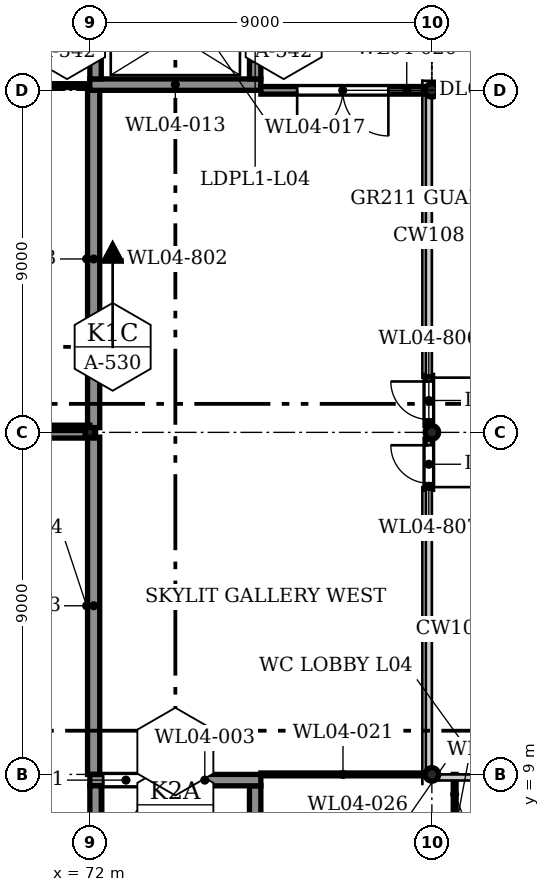
"""IFC4 building model, lengths in metres.
Left out: names, types, materials, properties, quantities, classifications, styles, units other than length and angle.
Written with IfcOpenShell. Run it as: python <this file> out.ifc"""

import sys

from ifc_helpers import new_model, si_unit, direction, frame, frame_2d, origin, origin_2d, place, context, subcontext, project, spatial, polyline, rectangle, hollow_rectangle, hollow_circle, outline, extrude, element, fill, save


model = new_model("IFC4")
c1 = context("Model", 3, precision=1e-05, world=origin(), true_north=direction((0.0, 1.0)))
c2 = subcontext(c1, "Body", "Model", "MODEL_VIEW")
j1 = project(units=[si_unit("LENGTHUNIT", "METRE"), si_unit("PLANEANGLEUNIT", "RADIAN")], contexts=[c1])
p1 = place(None, origin())
s1 = spatial("IfcSite", under=j1, at=p1, CompositionType="ELEMENT")
p2 = place(p1, origin())
s2 = spatial("IfcBuilding", under=s1, at=p2, CompositionType="ELEMENT")
p3 = place(p2, frame((0.0, 0.0, 21.2)))
s3 = spatial("IfcBuildingStorey", under=s2, at=p3, CompositionType="ELEMENT", Elevation=21.2)
p4 = place(p3, frame((81.0, 9.0, 0.0), z_axis=(0.0, 0.0, 1.0), x_axis=(1.0, 0.0, 0.0)))
e1 = element("IfcColumn", 1, at=p4, inside=s3, PredefinedType="COLUMN", context=c2, shape_type="SweptSolid", body=[
    extrude(hollow_circle(Radius=0.178, WallThickness=0.013, at=origin_2d()), origin(), (0.0, 0.0, 1.0), 3.6),
])
p5 = place(p3, frame((72.0, 18.0, 0.0), z_axis=(0.0, 0.0, 1.0), x_axis=(1.0, 0.0, 0.0)))
e2 = element("IfcColumn", 2, at=p5, inside=s3, PredefinedType="COLUMN", context=c2, shape_type="SweptSolid", body=[
    extrude(hollow_rectangle(XDim=0.25, YDim=0.25, WallThickness=0.01, InnerFilletRadius=0.015, OuterFilletRadius=0.025, at=origin_2d()), origin(), (0.0, 0.0, 1.0), 3.6),
])
for number, where, z_axis, x_axis in (
    (3, (81.0, 18.0, 0.0), (0.0, 0.0, 1.0), (1.0, 0.0, 0.0)),
    (4, (81.0, 27.0, 0.0), (0.0, 0.0, 1.0), (1.0, 0.0, 0.0)),
):
    element("IfcColumn", number, at=place(p3, frame(where, z_axis=z_axis, x_axis=x_axis)), inside=s3, PredefinedType="COLUMN", context=c2, shape_type="SweptSolid", body=[
        extrude(hollow_circle(Radius=0.178, WallThickness=0.013, at=origin_2d()), origin(), (0.0, 0.0, 1.0), 3.6),
    ])
for number, where, z_axis, x_axis in (
    (5, (72.1, 18.125, 0.0), (0.0, 0.0, 1.0), (0.0, 1.0, 0.0)),
    (6, (72.1, 9.0, 0.0), (0.0, 0.0, 1.0), (0.0, 1.0, 0.0)),
):
    element("IfcWall", number, at=place(p3, frame(where, z_axis=z_axis, x_axis=x_axis)), inside=s3, PredefinedType="SOLIDWALL", context=c2, shape_type="SweptSolid", body=[
        extrude(rectangle(XDim=8.875, YDim=0.32, at=frame_2d((4.438, 0.0))), origin(), (0.0, 0.0, 1.0), 3.878),
    ])
p6 = place(p3, frame((80.92, 18.178, 0.0), z_axis=(0.0, 0.0, 1.0), x_axis=(0.0, 1.0, 0.0)))
e7 = element("IfcWall", 7, at=p6, inside=s3, PredefinedType="SOLIDWALL", context=c2, shape_type="SweptSolid", body=[
    extrude(rectangle(XDim=1.322, YDim=0.2, at=frame_2d((0.661, 0.0))), origin(), (0.0, 0.0, 1.0), 3.878),
])
p7 = place(p6, frame((0.161, 0.0, 0.0)))
e8 = element("IfcOpeningElement", 8, at=p7, cuts=e7, PredefinedType="OPENING", context=c2, shape_type="SweptSolid", body=[
    extrude(rectangle(XDim=1.0, YDim=2.4, at=frame_2d((0.5, 1.2))), frame((0.0, 0.11, 0.0), z_axis=(0.0, -1.0, 0.0), x_axis=(1.0, 0.0, 0.0)), (0.0, 0.0, 1.0), 0.22),
])
p8 = place(p3, frame((80.92, 16.5, 0.0), z_axis=(0.0, 0.0, 1.0), x_axis=(0.0, 1.0, 0.0)))
e9 = element("IfcWall", 9, at=p8, inside=s3, PredefinedType="SOLIDWALL", context=c2, shape_type="SweptSolid", body=[
    extrude(rectangle(XDim=1.322, YDim=0.2, at=frame_2d((0.661, 0.0))), origin(), (0.0, 0.0, 1.0), 3.878),
])
p9 = place(p8, frame((0.161, 0.0, 0.0)))
e10 = element("IfcOpeningElement", 10, at=p9, cuts=e9, PredefinedType="OPENING", context=c2, shape_type="SweptSolid", body=[
    extrude(rectangle(XDim=1.0, YDim=2.4, at=frame_2d((0.5, 1.2))), frame((0.0, 0.11, 0.0), z_axis=(0.0, -1.0, 0.0), x_axis=(1.0, 0.0, 0.0)), (0.0, 0.0, 1.0), 0.22),
])
p10 = place(p3, frame((62.85, 18.139, -0.122), z_axis=(0.0, 0.0, 1.0), x_axis=(1.0, 0.0, 0.0)))
e11 = element("IfcWall", 11, at=p10, inside=s3, PredefinedType="SOLIDWALL", context=c2, shape_type="SweptSolid", body=[
    extrude(rectangle(XDim=9.15, YDim=0.1, at=frame_2d((4.575, 0.0))), origin(), (0.0, 0.0, 1.0), 1.722),
])
p11 = place(p10, frame((0.6, 0.0, 0.15)))
e12 = element("IfcOpeningElement", 12, at=p11, cuts=e11, PredefinedType="OPENING", context=c2, shape_type="SweptSolid", body=[
    extrude(rectangle(XDim=3.6, YDim=1.0, at=frame_2d((1.8, 0.5))), frame((0.0, 0.06, 0.0), z_axis=(0.0, -1.0, 0.0), x_axis=(1.0, 0.0, 0.0)), (0.0, 0.0, 1.0), 0.12),
])
p12 = place(p10, frame((5.1, 0.0, 0.15)))
e13 = element("IfcOpeningElement", 13, at=p12, cuts=e11, PredefinedType="OPENING", context=c2, shape_type="SweptSolid", body=[
    extrude(rectangle(XDim=3.6, YDim=1.0, at=frame_2d((1.8, 0.5))), frame((0.0, 0.06, 0.0), z_axis=(0.0, -1.0, 0.0), x_axis=(1.0, 0.0, 0.0)), (0.0, 0.0, 1.0), 0.12),
])
p13 = place(p3, frame((27.0, 27.125, -0.146), z_axis=(0.0, 0.0, 1.0), x_axis=(1.0, 0.0, 0.0)))
e14 = element("IfcWall", 14, at=p13, inside=s3, PredefinedType="SOLIDWALL", context=c2, shape_type="SweptSolid", body=[
    extrude(rectangle(XDim=45.0, YDim=0.1, at=frame_2d((22.5, 0.0))), origin(), (0.0, 0.0, 1.0), 1.746),
])
p14 = place(p13, frame((0.45, 0.0, 0.15)))
e15 = element("IfcOpeningElement", 15, at=p14, cuts=e14, PredefinedType="OPENING", context=c2, shape_type="SweptSolid", body=[
    extrude(rectangle(XDim=3.6, YDim=1.0, at=frame_2d((1.8, 0.5))), frame((0.0, 0.06, 0.0), z_axis=(0.0, -1.0, 0.0), x_axis=(1.0, 0.0, 0.0)), (0.0, 0.0, 1.0), 0.12),
])
p15 = place(p13, frame((4.95, 0.0, 0.15)))
e16 = element("IfcOpeningElement", 16, at=p15, cuts=e14, PredefinedType="OPENING", context=c2, shape_type="SweptSolid", body=[
    extrude(rectangle(XDim=3.6, YDim=1.0, at=frame_2d((1.8, 0.5))), frame((0.0, 0.06, 0.0), z_axis=(0.0, -1.0, 0.0), x_axis=(1.0, 0.0, 0.0)), (0.0, 0.0, 1.0), 0.12),
])
p16 = place(p13, frame((9.45, 0.0, 0.15)))
e17 = element("IfcOpeningElement", 17, at=p16, cuts=e14, PredefinedType="OPENING", context=c2, shape_type="SweptSolid", body=[
    extrude(rectangle(XDim=3.6, YDim=1.0, at=frame_2d((1.8, 0.5))), frame((0.0, 0.06, 0.0), z_axis=(0.0, -1.0, 0.0), x_axis=(1.0, 0.0, 0.0)), (0.0, 0.0, 1.0), 0.12),
])
p17 = place(p13, frame((13.95, 0.0, 0.15)))
e18 = element("IfcOpeningElement", 18, at=p17, cuts=e14, PredefinedType="OPENING", context=c2, shape_type="SweptSolid", body=[
    extrude(rectangle(XDim=3.6, YDim=1.0, at=frame_2d((1.8, 0.5))), frame((0.0, 0.06, 0.0), z_axis=(0.0, -1.0, 0.0), x_axis=(1.0, 0.0, 0.0)), (0.0, 0.0, 1.0), 0.12),
])
p18 = place(p13, frame((18.45, 0.0, 0.15)))
e19 = element("IfcOpeningElement", 19, at=p18, cuts=e14, PredefinedType="OPENING", context=c2, shape_type="SweptSolid", body=[
    extrude(rectangle(XDim=3.6, YDim=1.0, at=frame_2d((1.8, 0.5))), frame((0.0, 0.06, 0.0), z_axis=(0.0, -1.0, 0.0), x_axis=(1.0, 0.0, 0.0)), (0.0, 0.0, 1.0), 0.12),
])
p19 = place(p13, frame((22.95, 0.0, 0.15)))
e20 = element("IfcOpeningElement", 20, at=p19, cuts=e14, PredefinedType="OPENING", context=c2, shape_type="SweptSolid", body=[
    extrude(rectangle(XDim=3.6, YDim=1.0, at=frame_2d((1.8, 0.5))), frame((0.0, 0.06, 0.0), z_axis=(0.0, -1.0, 0.0), x_axis=(1.0, 0.0, 0.0)), (0.0, 0.0, 1.0), 0.12),
])
p20 = place(p13, frame((27.45, 0.0, 0.15)))
e21 = element("IfcOpeningElement", 21, at=p20, cuts=e14, PredefinedType="OPENING", context=c2, shape_type="SweptSolid", body=[
    extrude(rectangle(XDim=3.6, YDim=1.0, at=frame_2d((1.8, 0.5))), frame((0.0, 0.06, 0.0), z_axis=(0.0, -1.0, 0.0), x_axis=(1.0, 0.0, 0.0)), (0.0, 0.0, 1.0), 0.12),
])
p21 = place(p13, frame((31.95, 0.0, 0.15)))
e22 = element("IfcOpeningElement", 22, at=p21, cuts=e14, PredefinedType="OPENING", context=c2, shape_type="SweptSolid", body=[
    extrude(rectangle(XDim=3.6, YDim=1.0, at=frame_2d((1.8, 0.5))), frame((0.0, 0.06, 0.0), z_axis=(0.0, -1.0, 0.0), x_axis=(1.0, 0.0, 0.0)), (0.0, 0.0, 1.0), 0.12),
])
p22 = place(p13, frame((36.45, 0.0, 0.15)))
e23 = element("IfcOpeningElement", 23, at=p22, cuts=e14, PredefinedType="OPENING", context=c2, shape_type="SweptSolid", body=[
    extrude(rectangle(XDim=3.6, YDim=1.0, at=frame_2d((1.8, 0.5))), frame((0.0, 0.06, 0.0), z_axis=(0.0, -1.0, 0.0), x_axis=(1.0, 0.0, 0.0)), (0.0, 0.0, 1.0), 0.12),
])
p23 = place(p13, frame((40.95, 0.0, 0.15)))
e24 = element("IfcOpeningElement", 24, at=p23, cuts=e14, PredefinedType="OPENING", context=c2, shape_type="SweptSolid", body=[
    extrude(rectangle(XDim=3.6, YDim=1.0, at=frame_2d((1.8, 0.5))), frame((0.0, 0.06, 0.0), z_axis=(0.0, -1.0, 0.0), x_axis=(1.0, 0.0, 0.0)), (0.0, 0.0, 1.0), 0.12),
])
p24 = place(p2, frame((0.0, 0.0, 25.2)))
s4 = spatial("IfcBuildingStorey", under=s2, at=p24, CompositionType="ELEMENT", Elevation=25.2)
p25 = place(p24, frame((72.0, 18.139, -4.146), z_axis=(0.0, 0.0, 1.0), x_axis=(1.0, 0.0, 0.0)))
e25 = element("IfcWall", 25, at=p25, inside=s4, PredefinedType="SOLIDWALL", context=c2, shape_type="SweptSolid", body=[
    extrude(rectangle(XDim=9.0, YDim=0.1, at=frame_2d((4.5, 0.0))), origin(), (0.0, 0.0, 1.0), 5.746),
])
p26 = place(p25, frame((0.45, 0.0, 0.15)))
e26 = element("IfcOpeningElement", 26, at=p26, cuts=e25, PredefinedType="OPENING", context=c2, shape_type="SweptSolid", body=[
    extrude(rectangle(XDim=3.6, YDim=1.0, at=frame_2d((1.8, 0.5))), frame((0.0, 0.06, 0.0), z_axis=(0.0, -1.0, 0.0), x_axis=(1.0, 0.0, 0.0)), (0.0, 0.0, 1.0), 0.12),
])
p27 = place(p25, frame((4.95, 0.0, 0.15)))
e27 = element("IfcOpeningElement", 27, at=p27, cuts=e25, PredefinedType="OPENING", context=c2, shape_type="SweptSolid", body=[
    extrude(rectangle(XDim=3.6, YDim=1.0, at=frame_2d((1.8, 0.5))), frame((0.0, 0.06, 0.0), z_axis=(0.0, -1.0, 0.0), x_axis=(1.0, 0.0, 0.0)), (0.0, 0.0, 1.0), 0.12),
])
p28 = place(p3, frame((62.85, 17.95, -0.122), z_axis=(0.0, 0.0, 1.0), x_axis=(1.0, 0.0, 0.0)))
e28 = element("IfcWall", 28, at=p28, inside=s3, PredefinedType="PARAPET", context=c2, shape_type="SweptSolid", body=[
    extrude(rectangle(XDim=9.3, YDim=0.2, at=frame_2d((4.65, 0.0))), origin(), (0.0, 0.0, 1.0), 1.1),
])
p29 = place(p3, frame((72.1, 9.175, 3.878), z_axis=(0.0, 0.0, 1.0), x_axis=(0.0, 1.0, 0.0)))
e29 = element("IfcWall", 29, at=p29, inside=s3, PredefinedType="SOLIDWALL", context=c2, shape_type="SweptSolid", body=[
    extrude(outline(polyline([(0.0, 0.0), (8.825, 0.0), (8.825, 0.05), (0.0, 1.6), (0.0, 0.0)])), frame((0.0, 0.05, 0.0), z_axis=(0.0, -1.0, 0.0), x_axis=(1.0, 0.0, 0.0)), (0.0, 0.0, 1.0), 0.1),
])
p30 = place(p3, frame((72.1, 18.189, 3.878), z_axis=(0.0, 0.0, 1.0), x_axis=(0.0, 1.0, 0.0)))
e30 = element("IfcWall", 30, at=p30, inside=s3, PredefinedType="SOLIDWALL", context=c2, shape_type="SweptSolid", body=[
    extrude(outline(polyline([(0.0, 0.0), (8.811, 0.0), (8.811, 0.05), (0.0, 1.6), (0.0, 0.0)])), frame((0.0, 0.05, 0.0), z_axis=(0.0, -1.0, 0.0), x_axis=(1.0, 0.0, 0.0)), (0.0, 0.0, 1.0), 0.1),
])
p31 = place(p3, frame((76.35, 0.3, 0.0), z_axis=(0.0, 0.0, 1.0), x_axis=(0.0, 1.0, 0.0)))
e31 = element("IfcWall", 31, at=p31, inside=s3, PredefinedType="SOLIDWALL", context=c2, shape_type="SweptSolid", body=[
    extrude(rectangle(XDim=8.4, YDim=0.3, at=frame_2d((4.2, 0.0))), origin(), (0.0, 0.0, 1.0), 3.628),
])
p32 = place(p3, frame((72.0, 8.85, 0.0), z_axis=(0.0, 0.0, 1.0), x_axis=(1.0, 0.0, 0.0)))
e32 = element("IfcWall", 32, at=p32, inside=s3, PredefinedType="SOLIDWALL", context=c2, shape_type="SweptSolid", body=[
    extrude(rectangle(XDim=4.5, YDim=0.3, at=frame_2d((2.25, 0.0))), origin(), (0.0, 0.0, 1.0), 3.628),
])
p33 = place(p32, frame((0.35, 0.0, 0.0)))
e33 = element("IfcOpeningElement", 33, at=p33, cuts=e32, PredefinedType="OPENING", context=c2, shape_type="SweptSolid", body=[
    extrude(rectangle(XDim=1.2, YDim=2.1, at=frame_2d((0.6, 1.05))), frame((0.0, 0.16, 0.0), z_axis=(0.0, -1.0, 0.0), x_axis=(1.0, 0.0, 0.0)), (0.0, 0.0, 1.0), 0.32),
])
p34 = place(p3, frame((72.15, 0.3, 0.0), z_axis=(0.0, 0.0, 1.0), x_axis=(0.0, 1.0, 0.0)))
e34 = element("IfcWall", 34, at=p34, inside=s3, PredefinedType="SOLIDWALL", context=c2, shape_type="SweptSolid", body=[
    extrude(rectangle(XDim=8.4, YDim=0.3, at=frame_2d((4.2, 0.0))), origin(), (0.0, 0.0, 1.0), 3.628),
])
p35 = place(p3, frame((72.0, 27.15, 0.0), z_axis=(0.0, 0.0, 1.0), x_axis=(1.0, 0.0, 0.0)))
e35 = element("IfcWall", 35, at=p35, inside=s3, PredefinedType="SOLIDWALL", context=c2, shape_type="SweptSolid", body=[
    extrude(rectangle(XDim=4.5, YDim=0.3, at=frame_2d((2.25, 0.0))), origin(), (0.0, 0.0, 1.0), 3.628),
])
p36 = place(p3, frame((76.35, 27.3, 0.0), z_axis=(0.0, 0.0, 1.0), x_axis=(0.0, 1.0, 0.0)))
e36 = element("IfcWall", 36, at=p36, inside=s3, PredefinedType="SOLIDWALL", context=c2, shape_type="SweptSolid", body=[
    extrude(rectangle(XDim=8.4, YDim=0.3, at=frame_2d((4.2, 0.0))), origin(), (0.0, 0.0, 1.0), 3.628),
])
p37 = place(p36, frame((0.45, 0.0, 0.0)))
e37 = element("IfcOpeningElement", 37, at=p37, cuts=e36, PredefinedType="OPENING", context=c2, shape_type="SweptSolid", body=[
    extrude(rectangle(XDim=1.4, YDim=2.1, at=frame_2d((0.7, 1.05))), frame((0.0, 0.16, 0.0), z_axis=(0.0, -1.0, 0.0), x_axis=(1.0, 0.0, 0.0)), (0.0, 0.0, 1.0), 0.32),
])
p38 = place(p36, frame((4.925, 0.0, 0.0)))
e38 = element("IfcOpeningElement", 38, at=p38, cuts=e36, PredefinedType="OPENING", context=c2, shape_type="SweptSolid", body=[
    extrude(rectangle(XDim=1.0, YDim=2.1, at=frame_2d((0.5, 1.05))), frame((0.0, 0.16, 0.0), z_axis=(0.0, -1.0, 0.0), x_axis=(1.0, 0.0, 0.0)), (0.0, 0.0, 1.0), 0.32),
])
p39 = place(p3, frame((72.15, 27.3, 0.0), z_axis=(0.0, 0.0, 1.0), x_axis=(0.0, 1.0, 0.0)))
e39 = element("IfcWall", 39, at=p39, inside=s3, PredefinedType="SOLIDWALL", context=c2, shape_type="SweptSolid", body=[
    extrude(rectangle(XDim=8.4, YDim=0.3, at=frame_2d((4.2, 0.0))), origin(), (0.0, 0.0, 1.0), 3.628),
])
p40 = place(p3, frame((76.5, 27.0, 0.0), z_axis=(0.0, 0.0, 1.0), x_axis=(1.0, 0.0, 0.0)))
e40 = element("IfcWall", 40, at=p40, inside=s3, PredefinedType="PARTITIONING", context=c2, shape_type="SweptSolid", body=[
    extrude(rectangle(XDim=4.322, YDim=0.2, at=frame_2d((2.161, 0.0))), origin(), (0.0, 0.0, 1.0), 3.54),
])
p41 = place(p40, frame((0.955, 0.0, 0.0)))
e41 = element("IfcOpeningElement", 41, at=p41, cuts=e40, PredefinedType="OPENING", context=c2, shape_type="SweptSolid", body=[
    extrude(rectangle(XDim=2.4, YDim=2.4, at=frame_2d((1.2, 1.2))), frame((0.0, 0.11, 0.0), z_axis=(0.0, -1.0, 0.0), x_axis=(1.0, 0.0, 0.0)), (0.0, 0.0, 1.0), 0.22),
])
p42 = place(p3, frame((76.5, 9.0, 0.0), z_axis=(0.0, 0.0, 1.0), x_axis=(1.0, 0.0, 0.0)))
e42 = element("IfcWall", 42, at=p42, inside=s3, PredefinedType="PARTITIONING", context=c2, shape_type="SweptSolid", body=[
    extrude(rectangle(XDim=4.322, YDim=0.075, at=frame_2d((2.161, 0.0))), origin(), (0.0, 0.0, 1.0), 3.54),
])
p43 = place(p3, frame((81.6, 6.0, 0.0), z_axis=(0.0, 0.0, 1.0), x_axis=(0.0, 1.0, 0.0)))
e43 = element("IfcWall", 43, at=p43, inside=s3, PredefinedType="PARTITIONING", context=c2, shape_type="SweptSolid", body=[
    extrude(rectangle(XDim=3.0, YDim=0.075, at=frame_2d((1.5, 0.0))), origin(), (0.0, 0.0, 1.0), 3.54),
])
p44 = place(p43, frame((0.95, 0.0, 0.0)))
e44 = element("IfcOpeningElement", 44, at=p44, cuts=e43, PredefinedType="OPENING", context=c2, shape_type="SweptSolid", body=[
    extrude(rectangle(XDim=1.0, YDim=2.1, at=frame_2d((0.5, 1.05))), frame((0.0, 0.047, 0.0), z_axis=(0.0, -1.0, 0.0), x_axis=(1.0, 0.0, 0.0)), (0.0, 0.0, 1.0), 0.095),
])
p45 = place(p7, origin())
e45 = element("IfcDoor", 45, at=p45, inside=s3, OperationType="SINGLE_SWING_LEFT", PredefinedType="DOOR", context=c2, shape_type="SweptSolid", body=[
    extrude(rectangle(XDim=1.0, YDim=2.4, at=frame_2d((0.5, 1.2))), frame((0.0, 0.025, 0.0), z_axis=(0.0, -1.0, 0.0), x_axis=(1.0, 0.0, 0.0)), (0.0, 0.0, 1.0), 0.05),
])
fill(e8, e45)
p46 = place(p9, origin())
e46 = element("IfcDoor", 46, at=p46, inside=s3, OperationType="SINGLE_SWING_LEFT", PredefinedType="DOOR", context=c2, shape_type="SweptSolid", body=[
    extrude(rectangle(XDim=1.0, YDim=2.4, at=frame_2d((0.5, 1.2))), frame((0.0, 0.025, 0.0), z_axis=(0.0, -1.0, 0.0), x_axis=(1.0, 0.0, 0.0)), (0.0, 0.0, 1.0), 0.05),
])
fill(e10, e46)
p47 = place(p24, frame((72.0, 9.125, -0.146), z_axis=(0.0, 0.0, 1.0), x_axis=(1.0, 0.0, 0.0)))
p48 = place(p47, frame((0.45, 0.0, 0.15)))
p49 = place(p48, origin())
e47 = element("IfcWindow", 47, at=p49, inside=s3, PartitioningType="SINGLE_PANEL", PredefinedType="SKYLIGHT", context=c2, shape_type="SweptSolid", body=[
    extrude(rectangle(XDim=3.6, YDim=1.0, at=frame_2d((1.8, 0.5))), frame((0.0, 0.03, 0.0), z_axis=(0.0, -1.0, 0.0), x_axis=(1.0, 0.0, 0.0)), (0.0, 0.0, 1.0), 0.06),
])
p50 = place(p47, frame((4.95, 0.0, 0.15)))
p51 = place(p50, origin())
e48 = element("IfcWindow", 48, at=p51, inside=s3, PartitioningType="SINGLE_PANEL", PredefinedType="SKYLIGHT", context=c2, shape_type="SweptSolid", body=[
    extrude(rectangle(XDim=3.6, YDim=1.0, at=frame_2d((1.8, 0.5))), frame((0.0, 0.03, 0.0), z_axis=(0.0, -1.0, 0.0), x_axis=(1.0, 0.0, 0.0)), (0.0, 0.0, 1.0), 0.06),
])
p52 = place(p24, frame((81.0, 9.125, -0.146), z_axis=(0.0, 0.0, 1.0), x_axis=(1.0, 0.0, 0.0)))
p53 = place(p52, frame((0.45, 0.0, 0.15)))
p54 = place(p53, origin())
e49 = element("IfcWindow", 49, at=p54, inside=s3, PartitioningType="SINGLE_PANEL", PredefinedType="SKYLIGHT", context=c2, shape_type="SweptSolid", body=[
    extrude(rectangle(XDim=3.6, YDim=1.0, at=frame_2d((1.8, 0.5))), frame((0.0, 0.03, 0.0), z_axis=(0.0, -1.0, 0.0), x_axis=(1.0, 0.0, 0.0)), (0.0, 0.0, 1.0), 0.06),
])
p55 = place(p26, origin())
e50 = element("IfcWindow", 50, at=p55, inside=s3, PartitioningType="SINGLE_PANEL", PredefinedType="SKYLIGHT", context=c2, shape_type="SweptSolid", body=[
    extrude(rectangle(XDim=3.6, YDim=1.0, at=frame_2d((1.8, 0.5))), frame((0.0, 0.03, 0.0), z_axis=(0.0, -1.0, 0.0), x_axis=(1.0, 0.0, 0.0)), (0.0, 0.0, 1.0), 0.06),
])
fill(e26, e50)
p56 = place(p27, origin())
e51 = element("IfcWindow", 51, at=p56, inside=s3, PartitioningType="SINGLE_PANEL", PredefinedType="SKYLIGHT", context=c2, shape_type="SweptSolid", body=[
    extrude(rectangle(XDim=3.6, YDim=1.0, at=frame_2d((1.8, 0.5))), frame((0.0, 0.03, 0.0), z_axis=(0.0, -1.0, 0.0), x_axis=(1.0, 0.0, 0.0)), (0.0, 0.0, 1.0), 0.06),
])
fill(e27, e51)
p57 = place(p24, frame((81.0, 18.139, -0.14), z_axis=(0.0, 0.0, 1.0), x_axis=(1.0, 0.0, 0.0)))
p58 = place(p57, frame((0.45, 0.0, 0.15)))
p59 = place(p58, origin())
e52 = element("IfcWindow", 52, at=p59, inside=s3, PartitioningType="SINGLE_PANEL", PredefinedType="SKYLIGHT", context=c2, shape_type="SweptSolid", body=[
    extrude(rectangle(XDim=3.6, YDim=1.0, at=frame_2d((1.8, 0.5))), frame((0.0, 0.03, 0.0), z_axis=(0.0, -1.0, 0.0), x_axis=(1.0, 0.0, 0.0)), (0.0, 0.0, 1.0), 0.06),
])
p60 = place(p24, frame((76.85, 27.125, -0.146), z_axis=(0.0, 0.0, 1.0), x_axis=(1.0, 0.0, 0.0)))
p61 = place(p60, frame((4.6, 0.0, 0.15)))
p62 = place(p61, origin())
e53 = element("IfcWindow", 53, at=p62, inside=s3, PartitioningType="SINGLE_PANEL", PredefinedType="SKYLIGHT", context=c2, shape_type="SweptSolid", body=[
    extrude(rectangle(XDim=3.6, YDim=1.0, at=frame_2d((1.8, 0.5))), frame((0.0, 0.03, 0.0), z_axis=(0.0, -1.0, 0.0), x_axis=(1.0, 0.0, 0.0)), (0.0, 0.0, 1.0), 0.06),
])
p63 = place(p33, frame((1.2, 0.0, 0.0), z_axis=(0.0, 0.0, 1.0), x_axis=(-1.0, 0.0, 0.0)))
e54 = element("IfcDoor", 54, at=p63, inside=s3, OperationType="SINGLE_SWING_LEFT", PredefinedType="DOOR", context=c2, shape_type="SweptSolid", body=[
    extrude(rectangle(XDim=1.2, YDim=2.1, at=frame_2d((0.6, 1.05))), frame((0.0, 0.025, 0.0), z_axis=(0.0, -1.0, 0.0), x_axis=(1.0, 0.0, 0.0)), (0.0, 0.0, 1.0), 0.05),
])
fill(e33, e54)
p64 = place(p37, origin())
e55 = element("IfcDoor", 55, at=p64, inside=s3, OperationType="SLIDING_TO_LEFT", PredefinedType="DOOR", context=c2, shape_type="SweptSolid", body=[
    extrude(rectangle(XDim=1.4, YDim=2.1, at=frame_2d((0.7, 1.05))), frame((0.0, 0.025, 0.0), z_axis=(0.0, -1.0, 0.0), x_axis=(1.0, 0.0, 0.0)), (0.0, 0.0, 1.0), 0.05),
])
fill(e37, e55)
p65 = place(p41, frame((2.4, 0.0, 0.0), z_axis=(0.0, 0.0, 1.0), x_axis=(-1.0, 0.0, 0.0)))
e56 = element("IfcDoor", 56, at=p65, inside=s3, OperationType="DOUBLE_DOOR_SINGLE_SWING", PredefinedType="DOOR", context=c2, shape_type="SweptSolid", body=[
    extrude(rectangle(XDim=2.4, YDim=2.4, at=frame_2d((1.2, 1.2))), frame((0.0, 0.025, 0.0), z_axis=(0.0, -1.0, 0.0), x_axis=(1.0, 0.0, 0.0)), (0.0, 0.0, 1.0), 0.05),
])
fill(e41, e56)
save(model, sys.argv[1])
